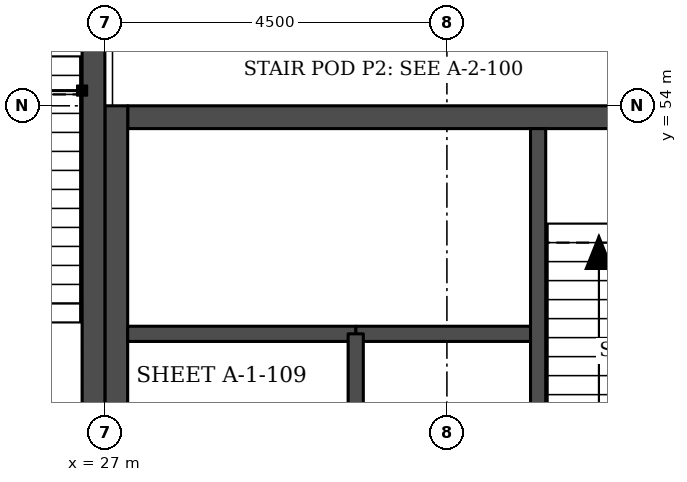
"""IFC4 building model, lengths in metres.
Left out: names, types, materials, properties, quantities, classifications, styles, units other than length and angle.
Written with IfcOpenShell. Run it as: python <this file> out.ifc"""

import sys

from ifc_helpers import new_model, si_unit, direction, frame, frame_2d, origin, place, context, subcontext, project, spatial, rectangle, extrude, element, save


model = new_model("IFC4")
c1 = context("Model", 3, precision=1e-05, world=origin(), true_north=direction((0.0, 1.0)))
c2 = subcontext(c1, "Body", "Model", "MODEL_VIEW")
j1 = project(units=[si_unit("LENGTHUNIT", "METRE"), si_unit("PLANEANGLEUNIT", "RADIAN")], contexts=[c1])
p1 = place(None, origin())
s1 = spatial("IfcSite", under=j1, at=p1, CompositionType="ELEMENT")
p2 = place(p1, origin())
s2 = spatial("IfcBuilding", under=s1, at=p2, CompositionType="ELEMENT")
p3 = place(p2, frame((0.0, 0.0, 134.4)))
s3 = spatial("IfcBuildingStorey", under=s2, at=p3, CompositionType="ELEMENT", Elevation=134.4)
p4 = place(p3, frame((27.3, 53.85, 0.0), z_axis=(0.0, 0.0, 1.0), x_axis=(1.0, 0.0, 0.0)))
e1 = element("IfcWall", 1, at=p4, inside=s3, PredefinedType="SHEAR", context=c2, shape_type="SweptSolid", body=[
    extrude(rectangle(XDim=8.4, YDim=0.3, at=frame_2d((4.2, 0.0))), origin(), (0.0, 0.0, 1.0), 3.7),
])
p5 = place(p4, frame((6.4, 0.0, 0.0)))
e2 = element("IfcOpeningElement", 2, at=p5, cuts=e1, PredefinedType="OPENING", context=c2, shape_type="SweptSolid", body=[
    extrude(rectangle(XDim=1.1, YDim=2.1, at=frame_2d((0.55, 1.05))), frame((0.0, 0.16, 0.0), z_axis=(0.0, -1.0, 0.0), x_axis=(1.0, 0.0, 0.0)), (0.0, 0.0, 1.0), 0.32),
])
p6 = place(p3, frame((27.15, 45.0, 0.0), z_axis=(0.0, 0.0, 1.0), x_axis=(0.0, 1.0, 0.0)))
e3 = element("IfcWall", 3, at=p6, inside=s3, PredefinedType="SHEAR", context=c2, shape_type="SweptSolid", body=[
    extrude(rectangle(XDim=9.0, YDim=0.3, at=frame_2d((4.5, 0.0))), origin(), (0.0, 0.0, 1.0), 3.7),
])
p7 = place(p6, frame((0.4, 0.0, 0.0)))
e4 = element("IfcOpeningElement", 4, at=p7, cuts=e3, PredefinedType="OPENING", context=c2, shape_type="SweptSolid", body=[
    extrude(rectangle(XDim=1.1, YDim=2.1, at=frame_2d((0.55, 1.05))), frame((0.0, 0.16, 0.0), z_axis=(0.0, -1.0, 0.0), x_axis=(1.0, 0.0, 0.0)), (0.0, 0.0, 1.0), 0.32),
])
p8 = place(p3, frame((26.85, 49.5, 0.0), z_axis=(0.0, 0.0, 1.0), x_axis=(0.0, 1.0, 0.0)))
e5 = element("IfcWall", 5, at=p8, inside=s3, PredefinedType="SHEAR", context=c2, shape_type="SweptSolid", body=[
    extrude(rectangle(XDim=9.0, YDim=0.3, at=frame_2d((4.5, 0.0))), origin(), (0.0, 0.0, 1.0), 3.7),
])
p9 = place(p8, frame((6.6, 0.0, 0.0)))
e6 = element("IfcOpeningElement", 6, at=p9, cuts=e5, PredefinedType="OPENING", context=c2, shape_type="SweptSolid", body=[
    extrude(rectangle(XDim=1.8, YDim=2.1, at=frame_2d((0.9, 1.05))), frame((0.0, 0.16, 0.0), z_axis=(0.0, -1.0, 0.0), x_axis=(1.0, 0.0, 0.0)), (0.0, 0.0, 1.0), 0.32),
])
p10 = place(p3, frame((30.3, 51.0, 0.0), z_axis=(0.0, 0.0, 1.0), x_axis=(1.0, 0.0, 0.0)))
e7 = element("IfcWall", 7, at=p10, inside=s3, PredefinedType="SOLIDWALL", context=c2, shape_type="SweptSolid", body=[
    extrude(rectangle(XDim=2.4, YDim=0.2, at=frame_2d((1.2, 0.0))), origin(), (0.0, 0.0, 1.0), 3.7),
])
p11 = place(p3, frame((27.3, 51.0, 0.0), z_axis=(0.0, 0.0, 1.0), x_axis=(1.0, 0.0, 0.0)))
e8 = element("IfcWall", 8, at=p11, inside=s3, PredefinedType="SOLIDWALL", context=c2, shape_type="SweptSolid", body=[
    extrude(rectangle(XDim=3.0, YDim=0.2, at=frame_2d((1.5, 0.0))), origin(), (0.0, 0.0, 1.0), 3.55),
])
for number, where, z_axis, x_axis in (
    (9, (30.3, 45.3, 0.0), (0.0, 0.0, 1.0), (0.0, 1.0, 0.0)),
    (10, (32.7, 48.0, 0.0), (0.0, 0.0, 1.0), (0.0, 1.0, 0.0)),
):
    element("IfcWall", number, at=place(p3, frame(where, z_axis=z_axis, x_axis=x_axis)), inside=s3, PredefinedType="SOLIDWALL", context=c2, shape_type="SweptSolid", body=[
        extrude(rectangle(XDim=5.7, YDim=0.2, at=frame_2d((2.85, 0.0))), origin(), (0.0, 0.0, 1.0), 3.55),
    ])
save(model, sys.argv[1])
